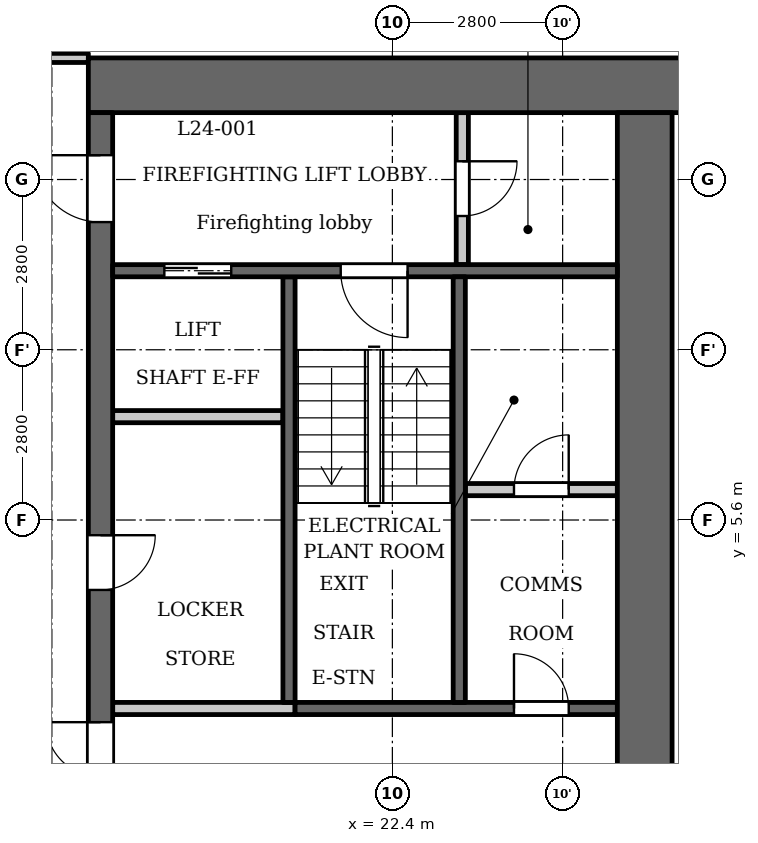
"""IFC4 building model, lengths in metres.
Left out: names, types, materials, properties, quantities, classifications, styles, units other than length and angle.
Written with IfcOpenShell. Run it as: python <this file> out.ifc"""

import sys

from ifc_helpers import new_model, si_unit, direction, frame, frame_2d, origin, place, context, subcontext, project, spatial, rectangle, extrude, element, fill, save


model = new_model("IFC4")
c1 = context("Model", 3, precision=1e-05, world=origin(), true_north=direction((0.0, 1.0)))
c2 = subcontext(c1, "Body", "Model", "MODEL_VIEW")
j1 = project(units=[si_unit("LENGTHUNIT", "METRE"), si_unit("PLANEANGLEUNIT", "RADIAN")], contexts=[c1])
p1 = place(None, origin())
s1 = spatial("IfcSite", under=j1, at=p1, CompositionType="ELEMENT")
p2 = place(p1, origin())
s2 = spatial("IfcBuilding", under=s1, at=p2, CompositionType="ELEMENT")
p3 = place(p2, frame((0.0, 0.0, 97.3)))
s3 = spatial("IfcBuildingStorey", under=s2, at=p3, CompositionType="ELEMENT", Elevation=97.3)
p4 = place(p3, frame((20.7, 2.6, 0.0), z_axis=(0.0, 0.0, 1.0), x_axis=(0.0, 1.0, 0.0)))
e1 = element("IfcWall", 1, at=p4, inside=s3, PredefinedType="SHEAR", context=c2, shape_type="SweptSolid", body=[
    extrude(rectangle(XDim=7.0, YDim=0.2, at=frame_2d((3.5, 0.0))), origin(), (0.0, 0.0, 1.0), 3.2),
])
p5 = place(p3, frame((20.8, 2.5, 0.0), z_axis=(0.0, 0.0, 1.0), x_axis=(1.0, 0.0, 0.0)))
e2 = element("IfcWall", 2, at=p5, inside=s3, PredefinedType="SHEAR", context=c2, shape_type="SweptSolid", body=[
    extrude(rectangle(XDim=5.3, YDim=0.2, at=frame_2d((2.65, 0.0))), origin(), (0.0, 0.0, 1.0), 3.2),
])
p6 = place(p5, frame((3.6, 0.0, 0.0)))
e3 = element("IfcOpeningElement", 3, at=p6, cuts=e2, PredefinedType="OPENING", context=c2, shape_type="SweptSolid", body=[
    extrude(rectangle(XDim=0.9, YDim=2.1, at=frame_2d((0.45, 1.05))), frame((0.0, 0.11, 0.0), z_axis=(0.0, -1.0, 0.0), x_axis=(1.0, 0.0, 0.0)), (0.0, 0.0, 1.0), 0.22),
])
p7 = place(p3, frame((17.4, 12.75, 0.0), z_axis=(0.0, 0.0, 1.0), x_axis=(1.0, 0.0, 0.0)))
e4 = element("IfcWall", 4, at=p7, inside=s3, PredefinedType="SHEAR", context=c2, shape_type="SweptSolid", body=[
    extrude(rectangle(XDim=10.4, YDim=0.9, at=frame_2d((5.2, 0.0))), origin(), (0.0, 0.0, 1.0), 3.2),
])
p8 = place(p3, frame((17.6, -12.3, 0.0), z_axis=(0.0, 0.0, 1.0), x_axis=(0.0, 1.0, 0.0)))
e5 = element("IfcWall", 5, at=p8, inside=s3, PredefinedType="SHEAR", context=c2, shape_type="SweptSolid", body=[
    extrude(rectangle(XDim=24.6, YDim=0.4, at=frame_2d((12.3, 0.0))), origin(), (0.0, 0.0, 1.0), 3.2),
])
p9 = place(p8, frame((6.0, 0.0, 0.0)))
e6 = element("IfcOpeningElement", 6, at=p9, cuts=e5, PredefinedType="OPENING", context=c2, shape_type="SweptSolid", body=[
    extrude(rectangle(XDim=1.1, YDim=2.1, at=frame_2d((0.55, 1.05))), frame((0.0, 0.21, 0.0), z_axis=(0.0, -1.0, 0.0), x_axis=(1.0, 0.0, 0.0)), (0.0, 0.0, 1.0), 0.42),
])
p10 = place(p8, frame((8.4, 0.0, 0.0)))
e7 = element("IfcOpeningElement", 7, at=p10, cuts=e5, PredefinedType="OPENING", context=c2, shape_type="SweptSolid", body=[
    extrude(rectangle(XDim=1.1, YDim=2.1, at=frame_2d((0.55, 1.05))), frame((0.0, 0.21, 0.0), z_axis=(0.0, -1.0, 0.0), x_axis=(1.0, 0.0, 0.0)), (0.0, 0.0, 1.0), 0.42),
])
p11 = place(p8, frame((10.8, 0.0, 0.0)))
e8 = element("IfcOpeningElement", 8, at=p11, cuts=e5, PredefinedType="OPENING", context=c2, shape_type="SweptSolid", body=[
    extrude(rectangle(XDim=1.1, YDim=2.1, at=frame_2d((0.55, 1.05))), frame((0.0, 0.21, 0.0), z_axis=(0.0, -1.0, 0.0), x_axis=(1.0, 0.0, 0.0)), (0.0, 0.0, 1.0), 0.42),
])
p12 = place(p8, frame((16.75, 0.0, 0.0)))
e9 = element("IfcOpeningElement", 9, at=p12, cuts=e5, PredefinedType="OPENING", context=c2, shape_type="SweptSolid", body=[
    extrude(rectangle(XDim=0.9, YDim=2.1, at=frame_2d((0.45, 1.05))), frame((0.0, 0.21, 0.0), z_axis=(0.0, -1.0, 0.0), x_axis=(1.0, 0.0, 0.0)), (0.0, 0.0, 1.0), 0.42),
])
p13 = place(p8, frame((22.8, 0.0, 0.0)))
e10 = element("IfcOpeningElement", 10, at=p13, cuts=e5, PredefinedType="OPENING", context=c2, shape_type="SweptSolid", body=[
    extrude(rectangle(XDim=1.1, YDim=2.1, at=frame_2d((0.55, 1.05))), frame((0.0, 0.21, 0.0), z_axis=(0.0, -1.0, 0.0), x_axis=(1.0, 0.0, 0.0)), (0.0, 0.0, 1.0), 0.42),
])
p14 = place(p8, frame((0.7, 0.0, 0.0)))
e11 = element("IfcOpeningElement", 11, at=p14, cuts=e5, PredefinedType="OPENING", context=c2, shape_type="SweptSolid", body=[
    extrude(rectangle(XDim=1.1, YDim=2.1, at=frame_2d((0.55, 1.05))), frame((0.0, 0.21, 0.0), z_axis=(0.0, -1.0, 0.0), x_axis=(1.0, 0.0, 0.0)), (0.0, 0.0, 1.0), 0.42),
])
p15 = place(p8, frame((12.775, 0.0, 0.0)))
e12 = element("IfcOpeningElement", 12, at=p15, cuts=e5, PredefinedType="OPENING", context=c2, shape_type="SweptSolid", body=[
    extrude(rectangle(XDim=1.8, YDim=2.1, at=frame_2d((0.9, 1.05))), frame((0.0, 0.21, 0.0), z_axis=(0.0, -1.0, 0.0), x_axis=(1.0, 0.0, 0.0)), (0.0, 0.0, 1.0), 0.42),
])
p16 = place(p3, frame((26.55, -12.3, 0.0), z_axis=(0.0, 0.0, 1.0), x_axis=(0.0, 1.0, 0.0)))
e13 = element("IfcWall", 13, at=p16, inside=s3, PredefinedType="SHEAR", context=c2, shape_type="SweptSolid", body=[
    extrude(rectangle(XDim=24.6, YDim=0.9, at=frame_2d((12.3, 0.0))), origin(), (0.0, 0.0, 1.0), 3.2),
])
p17 = place(p3, frame((23.55, 9.8, 0.0), z_axis=(0.0, 0.0, 1.0), x_axis=(0.0, 1.0, 0.0)))
e14 = element("IfcWall", 14, at=p17, inside=s3, PredefinedType="PARTITIONING", context=c2, shape_type="SweptSolid", body=[
    extrude(rectangle(XDim=2.5, YDim=0.2, at=frame_2d((1.25, 0.0))), origin(), (0.0, 0.0, 1.0), 3.2),
])
p18 = place(p17, frame((0.8, 0.0, 0.0)))
e15 = element("IfcOpeningElement", 15, at=p18, cuts=e14, PredefinedType="OPENING", context=c2, shape_type="SweptSolid", body=[
    extrude(rectangle(XDim=0.9, YDim=2.1, at=frame_2d((0.45, 1.05))), frame((0.0, 0.11, 0.0), z_axis=(0.0, -1.0, 0.0), x_axis=(1.0, 0.0, 0.0)), (0.0, 0.0, 1.0), 0.22),
])
p19 = place(p3, frame((23.6, 6.1, 0.0), z_axis=(0.0, 0.0, 1.0), x_axis=(1.0, 0.0, 0.0)))
e16 = element("IfcWall", 16, at=p19, inside=s3, PredefinedType="PARTITIONING", context=c2, shape_type="SweptSolid", body=[
    extrude(rectangle(XDim=2.5, YDim=0.2, at=frame_2d((1.25, 0.0))), origin(), (0.0, 0.0, 1.0), 3.2),
])
p20 = place(p19, frame((0.8, 0.0, 0.0)))
e17 = element("IfcOpeningElement", 17, at=p20, cuts=e16, PredefinedType="OPENING", context=c2, shape_type="SweptSolid", body=[
    extrude(rectangle(XDim=0.9, YDim=2.1, at=frame_2d((0.45, 1.05))), frame((0.0, 0.11, 0.0), z_axis=(0.0, -1.0, 0.0), x_axis=(1.0, 0.0, 0.0)), (0.0, 0.0, 1.0), 0.22),
])
p21 = place(p3, frame((17.8, 2.5, 0.0), z_axis=(0.0, 0.0, 1.0), x_axis=(1.0, 0.0, 0.0)))
e18 = element("IfcWall", 18, at=p21, inside=s3, PredefinedType="PARTITIONING", context=c2, shape_type="SweptSolid", body=[
    extrude(rectangle(XDim=3.0, YDim=0.2, at=frame_2d((1.5, 0.0))), origin(), (0.0, 0.0, 1.0), 3.2),
])
p22 = place(p3, frame((17.8, 7.3, 0.0), z_axis=(0.0, 0.0, 1.0), x_axis=(1.0, 0.0, 0.0)))
e19 = element("IfcWall", 19, at=p22, inside=s3, PredefinedType="PARTITIONING", context=c2, shape_type="SweptSolid", body=[
    extrude(rectangle(XDim=2.8, YDim=0.2, at=frame_2d((1.4, 0.0))), origin(), (0.0, 0.0, 1.0), 3.2),
])
p23 = place(p3, frame((17.8, 9.7, 0.0), z_axis=(0.0, 0.0, 1.0), x_axis=(1.0, 0.0, 0.0)))
e20 = element("IfcWall", 20, at=p23, inside=s3, PredefinedType="SHEAR", context=c2, shape_type="SweptSolid", body=[
    extrude(rectangle(XDim=8.3, YDim=0.2, at=frame_2d((4.15, 0.0))), origin(), (0.0, 0.0, 1.0), 3.2),
])
p24 = place(p23, frame((0.85, 0.0, 0.0)))
e21 = element("IfcOpeningElement", 21, at=p24, cuts=e20, PredefinedType="OPENING", context=c2, shape_type="SweptSolid", body=[
    extrude(rectangle(XDim=1.1, YDim=2.1, at=frame_2d((0.55, 1.05))), frame((0.0, 0.11, 0.0), z_axis=(0.0, -1.0, 0.0), x_axis=(1.0, 0.0, 0.0)), (0.0, 0.0, 1.0), 0.22),
])
p25 = place(p23, frame((3.75, 0.0, 0.0)))
e22 = element("IfcOpeningElement", 22, at=p25, cuts=e20, PredefinedType="OPENING", context=c2, shape_type="SweptSolid", body=[
    extrude(rectangle(XDim=1.1, YDim=2.1, at=frame_2d((0.55, 1.05))), frame((0.0, 0.11, 0.0), z_axis=(0.0, -1.0, 0.0), x_axis=(1.0, 0.0, 0.0)), (0.0, 0.0, 1.0), 0.22),
])
p26 = place(p3, frame((23.5, 2.6, 0.0), z_axis=(0.0, 0.0, 1.0), x_axis=(0.0, 1.0, 0.0)))
e23 = element("IfcWall", 23, at=p26, inside=s3, PredefinedType="SHEAR", context=c2, shape_type="SweptSolid", body=[
    extrude(rectangle(XDim=7.0, YDim=0.2, at=frame_2d((3.5, 0.0))), origin(), (0.0, 0.0, 1.0), 3.2),
])
p27 = place(p3, frame((-17.4, 13.2, 0.0), z_axis=(0.0, 0.0, 1.0), x_axis=(1.0, 0.0, 0.0)))
e24 = element("IfcWall", 24, at=p27, inside=s3, PredefinedType="PARTITIONING", context=c2, shape_type="SweptSolid", body=[
    extrude(rectangle(XDim=34.8, YDim=0.15, at=frame_2d((17.4, 0.0))), origin(), (0.0, 0.0, 1.0), 3.2),
])
p28 = place(p27, frame((0.75, 0.0, 0.0)))
e25 = element("IfcOpeningElement", 25, at=p28, cuts=e24, PredefinedType="OPENING", context=c2, shape_type="SweptSolid", body=[
    extrude(rectangle(XDim=1.0, YDim=2.1, at=frame_2d((0.5, 1.05))), frame((0.0, 0.085, 0.0), z_axis=(0.0, -1.0, 0.0), x_axis=(1.0, 0.0, 0.0)), (0.0, 0.0, 1.0), 0.17),
])
p29 = place(p27, frame((33.15, 0.0, 0.0)))
e26 = element("IfcOpeningElement", 26, at=p29, cuts=e24, PredefinedType="OPENING", context=c2, shape_type="SweptSolid", body=[
    extrude(rectangle(XDim=1.0, YDim=2.1, at=frame_2d((0.5, 1.05))), frame((0.0, 0.085, 0.0), z_axis=(0.0, -1.0, 0.0), x_axis=(1.0, 0.0, 0.0)), (0.0, 0.0, 1.0), 0.17),
])
p30 = place(p27, frame((6.85, 0.0, 0.0)))
e27 = element("IfcOpeningElement", 27, at=p30, cuts=e24, PredefinedType="OPENING", context=c2, shape_type="SweptSolid", body=[
    extrude(rectangle(XDim=1.0, YDim=2.1, at=frame_2d((0.5, 1.05))), frame((0.0, 0.085, 0.0), z_axis=(0.0, -1.0, 0.0), x_axis=(1.0, 0.0, 0.0)), (0.0, 0.0, 1.0), 0.17),
])
p31 = place(p27, frame((15.45, 0.0, 0.0)))
e28 = element("IfcOpeningElement", 28, at=p31, cuts=e24, PredefinedType="OPENING", context=c2, shape_type="SweptSolid", body=[
    extrude(rectangle(XDim=1.0, YDim=2.1, at=frame_2d((0.5, 1.05))), frame((0.0, 0.085, 0.0), z_axis=(0.0, -1.0, 0.0), x_axis=(1.0, 0.0, 0.0)), (0.0, 0.0, 1.0), 0.17),
])
p32 = place(p27, frame((21.4, 0.0, 0.0)))
e29 = element("IfcOpeningElement", 29, at=p32, cuts=e24, PredefinedType="OPENING", context=c2, shape_type="SweptSolid", body=[
    extrude(rectangle(XDim=1.0, YDim=2.1, at=frame_2d((0.5, 1.05))), frame((0.0, 0.085, 0.0), z_axis=(0.0, -1.0, 0.0), x_axis=(1.0, 0.0, 0.0)), (0.0, 0.0, 1.0), 0.17),
])
p33 = place(p27, frame((23.65, 0.0, 0.0)))
e30 = element("IfcOpeningElement", 30, at=p33, cuts=e24, PredefinedType="OPENING", context=c2, shape_type="SweptSolid", body=[
    extrude(rectangle(XDim=1.0, YDim=2.1, at=frame_2d((0.5, 1.05))), frame((0.0, 0.085, 0.0), z_axis=(0.0, -1.0, 0.0), x_axis=(1.0, 0.0, 0.0)), (0.0, 0.0, 1.0), 0.17),
])
p34 = place(p12, origin())
e31 = element("IfcDoor", 31, at=p34, inside=s3, OperationType="SINGLE_SWING_RIGHT", PredefinedType="DOOR", context=c2, shape_type="SweptSolid", body=[
    extrude(rectangle(XDim=0.9, YDim=2.1, at=frame_2d((0.45, 1.05))), frame((0.0, 0.025, 0.0), z_axis=(0.0, -1.0, 0.0), x_axis=(1.0, 0.0, 0.0)), (0.0, 0.0, 1.0), 0.05),
])
fill(e9, e31)
p35 = place(p24, origin())
e32 = element("IfcDoor", 32, at=p35, inside=s3, OperationType="DOUBLE_DOOR_SLIDING", PredefinedType="DOOR", context=c2, shape_type="SweptSolid", body=[
    extrude(rectangle(XDim=1.1, YDim=2.1, at=frame_2d((0.55, 1.05))), frame((0.0, 0.025, 0.0), z_axis=(0.0, -1.0, 0.0), x_axis=(1.0, 0.0, 0.0)), (0.0, 0.0, 1.0), 0.05),
])
fill(e21, e32)
p36 = place(p13, origin())
e33 = element("IfcDoor", 33, at=p36, inside=s3, OperationType="SINGLE_SWING_LEFT", PredefinedType="DOOR", context=c2, shape_type="SweptSolid", body=[
    extrude(rectangle(XDim=1.1, YDim=2.1, at=frame_2d((0.55, 1.05))), frame((0.0, 0.025, 0.0), z_axis=(0.0, -1.0, 0.0), x_axis=(1.0, 0.0, 0.0)), (0.0, 0.0, 1.0), 0.05),
])
fill(e10, e33)
p37 = place(p18, origin())
e34 = element("IfcDoor", 34, at=p37, inside=s3, OperationType="SINGLE_SWING_RIGHT", PredefinedType="DOOR", context=c2, shape_type="SweptSolid", body=[
    extrude(rectangle(XDim=0.9, YDim=2.1, at=frame_2d((0.45, 1.05))), frame((0.0, 0.025, 0.0), z_axis=(0.0, -1.0, 0.0), x_axis=(1.0, 0.0, 0.0)), (0.0, 0.0, 1.0), 0.05),
])
fill(e15, e34)
p38 = place(p25, origin())
e35 = element("IfcDoor", 35, at=p38, inside=s3, OperationType="SINGLE_SWING_RIGHT", PredefinedType="DOOR", context=c2, shape_type="SweptSolid", body=[
    extrude(rectangle(XDim=1.1, YDim=2.1, at=frame_2d((0.55, 1.05))), frame((0.0, 0.025, 0.0), z_axis=(0.0, -1.0, 0.0), x_axis=(1.0, 0.0, 0.0)), (0.0, 0.0, 1.0), 0.05),
])
fill(e22, e35)
p39 = place(p15, origin())
e36 = element("IfcDoor", 36, at=p39, inside=s3, OperationType="DOUBLE_DOOR_SINGLE_SWING", PredefinedType="DOOR", context=c2, shape_type="SweptSolid", body=[
    extrude(rectangle(XDim=1.8, YDim=2.1, at=frame_2d((0.9, 1.05))), frame((0.0, 0.025, 0.0), z_axis=(0.0, -1.0, 0.0), x_axis=(1.0, 0.0, 0.0)), (0.0, 0.0, 1.0), 0.05),
])
fill(e12, e36)
p40 = place(p20, origin())
e37 = element("IfcDoor", 37, at=p40, inside=s3, OperationType="SINGLE_SWING_LEFT", PredefinedType="DOOR", context=c2, shape_type="SweptSolid", body=[
    extrude(rectangle(XDim=0.9, YDim=2.1, at=frame_2d((0.45, 1.05))), frame((0.0, 0.025, 0.0), z_axis=(0.0, -1.0, 0.0), x_axis=(1.0, 0.0, 0.0)), (0.0, 0.0, 1.0), 0.05),
])
fill(e17, e37)
p41 = place(p6, origin())
e38 = element("IfcDoor", 38, at=p41, inside=s3, OperationType="SINGLE_SWING_RIGHT", PredefinedType="DOOR", context=c2, shape_type="SweptSolid", body=[
    extrude(rectangle(XDim=0.9, YDim=2.1, at=frame_2d((0.45, 1.05))), frame((0.0, 0.025, 0.0), z_axis=(0.0, -1.0, 0.0), x_axis=(1.0, 0.0, 0.0)), (0.0, 0.0, 1.0), 0.05),
])
fill(e3, e38)
save(model, sys.argv[1])
